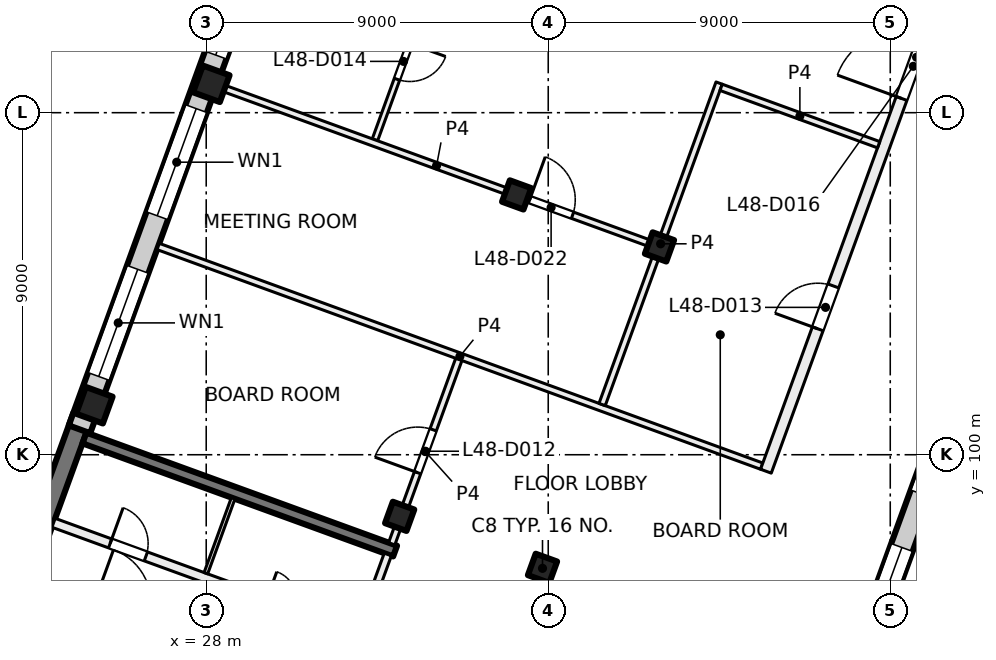
"""IFC4 building model, lengths in metres.
Left out: names, types, materials, properties, quantities, classifications, styles, units other than length and angle.
Written with IfcOpenShell. Run it as: python <this file> out.ifc"""

import sys

from ifc_helpers import new_model, si_unit, direction, frame, frame_2d, origin, origin_2d, place, context, subcontext, project, spatial, rectangle, extrude, element, fill, save


model = new_model("IFC4")
c1 = context("Model", 3, precision=1e-05, world=origin(), true_north=direction((0.0, 1.0)))
c2 = subcontext(c1, "Body", "Model", "MODEL_VIEW")
j1 = project(units=[si_unit("LENGTHUNIT", "METRE"), si_unit("PLANEANGLEUNIT", "RADIAN")], contexts=[c1])
p1 = place(None, origin())
s1 = spatial("IfcSite", under=j1, at=p1, CompositionType="ELEMENT")
p2 = place(p1, origin())
s2 = spatial("IfcBuilding", under=s1, at=p2, CompositionType="ELEMENT")
p3 = place(p2, frame((0.0, 0.0, 204.0)))
s3 = spatial("IfcBuildingStorey", under=s2, at=p3, CompositionType="ELEMENT", Elevation=204.0)
for number, where, z_axis, x_axis in (
    (1, (39.927, 105.468, 0.0), (0.0, 0.0, 1.0), (-0.342, -0.94, 0.0)),
    (2, (36.849, 97.011, 0.0), (0.0, 0.0, 1.0), (-0.342, -0.94, 0.0)),
    (3, (36.169, 106.836, 0.0), (0.0, 0.0, 1.0), (-0.342, -0.94, 0.0)),
    (4, (33.091, 98.379, 0.0), (0.0, 0.0, 1.0), (-0.342, -0.94, 0.0)),
):
    element("IfcColumn", number, at=place(p3, frame(where, z_axis=z_axis, x_axis=x_axis)), inside=s3, PredefinedType="COLUMN", context=c2, shape_type="SweptSolid", body=[
        extrude(rectangle(XDim=0.6, YDim=0.6, at=origin_2d()), origin(), (0.0, 0.0, 1.0), 4.0),
    ])
for number, where, z_axis, x_axis in (
    (5, (28.134, 109.76, 0.0), (0.0, 0.0, 1.0), (-0.342, -0.94, 0.0)),
    (6, (25.056, 101.303, 0.0), (0.0, 0.0, 1.0), (-0.342, -0.94, 0.0)),
):
    element("IfcColumn", number, at=place(p3, frame(where, z_axis=z_axis, x_axis=x_axis)), inside=s3, PredefinedType="COLUMN", context=c2, shape_type="SweptSolid", body=[
        extrude(rectangle(XDim=0.75, YDim=0.75, at=origin_2d()), origin(), (0.0, 0.0, 1.0), 4.0),
    ])
p4 = place(p3, frame((21.67, 92.585, 0.0), z_axis=(0.0, 0.0, 1.0), x_axis=(0.342035714298, 0.93968695327, 0.0)))
e7 = element("IfcWall", 7, at=p4, inside=s3, PredefinedType="SHEAR", context=c2, shape_type="SweptSolid", body=[
    extrude(rectangle(XDim=8.975, YDim=0.5, at=frame_2d((4.488, 0.0))), origin(), (0.0, 0.0, 1.0), 4.0),
])
p5 = place(p3, frame((32.971, 97.465, 0.0), z_axis=(0.0, 0.0, 1.0), x_axis=(-0.939695066972, 0.34201342241, 0.0)))
e8 = element("IfcWall", 8, at=p5, inside=s3, PredefinedType="SHEAR", context=c2, shape_type="SweptSolid", body=[
    extrude(rectangle(XDim=8.7, YDim=0.3, at=frame_2d((4.35, 0.0))), origin(), (0.0, 0.0, 1.0), 4.0),
])
p6 = place(p3, frame((52.212, 113.783, 0.0), z_axis=(0.0, 0.0, 1.0), x_axis=(-0.34202521188, -0.939690775968, 0.0)))
e9 = element("IfcWall", 9, at=p6, inside=s3, PredefinedType="SOLIDWALL", context=c2, shape_type="SweptSolid", body=[
    extrude(rectangle(XDim=21.745, YDim=0.6, at=frame_2d((10.873, 0.0))), origin(), (0.0, 0.0, 1.0), 3.625),
])
p7 = place(p6, frame((3.765, 0.0, 0.9)))
e10 = element("IfcOpeningElement", 10, at=p7, cuts=e9, PredefinedType="OPENING", context=c2, shape_type="SweptSolid", body=[
    extrude(rectangle(XDim=3.0, YDim=2.4, at=frame_2d((1.5, 1.2))), frame((0.0, 0.31, 0.0), z_axis=(0.0, -1.0, 0.0), x_axis=(1.0, 0.0, 0.0)), (0.0, 0.0, 1.0), 0.62),
])
p8 = place(p6, frame((8.265, 0.0, 0.9)))
e11 = element("IfcOpeningElement", 11, at=p8, cuts=e9, PredefinedType="OPENING", context=c2, shape_type="SweptSolid", body=[
    extrude(rectangle(XDim=3.0, YDim=2.4, at=frame_2d((1.5, 1.2))), frame((0.0, 0.31, 0.0), z_axis=(0.0, -1.0, 0.0), x_axis=(1.0, 0.0, 0.0)), (0.0, 0.0, 1.0), 0.62),
])
p9 = place(p6, frame((12.765, 0.0, 0.9)))
e12 = element("IfcOpeningElement", 12, at=p9, cuts=e9, PredefinedType="OPENING", context=c2, shape_type="SweptSolid", body=[
    extrude(rectangle(XDim=3.0, YDim=2.4, at=frame_2d((1.5, 1.2))), frame((0.0, 0.31, 0.0), z_axis=(0.0, -1.0, 0.0), x_axis=(1.0, 0.0, 0.0)), (0.0, 0.0, 1.0), 0.62),
])
p10 = place(p6, frame((17.265, 0.0, 0.9)))
e13 = element("IfcOpeningElement", 13, at=p10, cuts=e9, PredefinedType="OPENING", context=c2, shape_type="SweptSolid", body=[
    extrude(rectangle(XDim=3.0, YDim=2.4, at=frame_2d((1.5, 1.2))), frame((0.0, 0.31, 0.0), z_axis=(0.0, -1.0, 0.0), x_axis=(1.0, 0.0, 0.0)), (0.0, 0.0, 1.0), 0.62),
])
p11 = place(p3, frame((24.666, 100.669, 0.0), z_axis=(0.0, 0.0, 1.0), x_axis=(0.34201964167, 0.939692803373, 0.0)))
e14 = element("IfcWall", 14, at=p11, inside=s3, PredefinedType="SOLIDWALL", context=c2, shape_type="SweptSolid", body=[
    extrude(rectangle(XDim=32.884, YDim=0.6, at=frame_2d((16.442, 0.0))), origin(), (0.0, 0.0, 1.0), 3.625),
])
p12 = place(p11, frame((1.48, 0.0, 0.9)))
e15 = element("IfcOpeningElement", 15, at=p12, cuts=e14, PredefinedType="OPENING", context=c2, shape_type="SweptSolid", body=[
    extrude(rectangle(XDim=3.0, YDim=2.4, at=frame_2d((1.5, 1.2))), frame((0.0, 0.31, 0.0), z_axis=(0.0, -1.0, 0.0), x_axis=(1.0, 0.0, 0.0)), (0.0, 0.0, 1.0), 0.62),
])
p13 = place(p11, frame((5.98, 0.0, 0.9)))
e16 = element("IfcOpeningElement", 16, at=p13, cuts=e14, PredefinedType="OPENING", context=c2, shape_type="SweptSolid", body=[
    extrude(rectangle(XDim=3.0, YDim=2.4, at=frame_2d((1.5, 1.2))), frame((0.0, 0.31, 0.0), z_axis=(0.0, -1.0, 0.0), x_axis=(1.0, 0.0, 0.0)), (0.0, 0.0, 1.0), 0.62),
])
p14 = place(p11, frame((10.48, 0.0, 0.9)))
e17 = element("IfcOpeningElement", 17, at=p14, cuts=e14, PredefinedType="OPENING", context=c2, shape_type="SweptSolid", body=[
    extrude(rectangle(XDim=3.0, YDim=2.4, at=frame_2d((1.5, 1.2))), frame((0.0, 0.31, 0.0), z_axis=(0.0, -1.0, 0.0), x_axis=(1.0, 0.0, 0.0)), (0.0, 0.0, 1.0), 0.62),
])
p15 = place(p11, frame((15.58, 0.0, 0.0)))
e18 = element("IfcOpeningElement", 18, at=p15, cuts=e14, PredefinedType="OPENING", context=c2, shape_type="SweptSolid", body=[
    extrude(rectangle(XDim=1.8, YDim=2.4, at=frame_2d((0.9, 1.2))), frame((0.0, 0.31, 0.0), z_axis=(0.0, -1.0, 0.0), x_axis=(1.0, 0.0, 0.0)), (0.0, 0.0, 1.0), 0.62),
])
p16 = place(p11, frame((19.48, 0.0, 0.9)))
e19 = element("IfcOpeningElement", 19, at=p16, cuts=e14, PredefinedType="OPENING", context=c2, shape_type="SweptSolid", body=[
    extrude(rectangle(XDim=3.0, YDim=2.4, at=frame_2d((1.5, 1.2))), frame((0.0, 0.31, 0.0), z_axis=(0.0, -1.0, 0.0), x_axis=(1.0, 0.0, 0.0)), (0.0, 0.0, 1.0), 0.62),
])
p17 = place(p11, frame((23.98, 0.0, 0.9)))
e20 = element("IfcOpeningElement", 20, at=p17, cuts=e14, PredefinedType="OPENING", context=c2, shape_type="SweptSolid", body=[
    extrude(rectangle(XDim=3.0, YDim=2.4, at=frame_2d((1.5, 1.2))), frame((0.0, 0.31, 0.0), z_axis=(0.0, -1.0, 0.0), x_axis=(1.0, 0.0, 0.0)), (0.0, 0.0, 1.0), 0.62),
])
p18 = place(p11, frame((29.08, 0.0, 0.0)))
e21 = element("IfcOpeningElement", 21, at=p18, cuts=e14, PredefinedType="OPENING", context=c2, shape_type="SweptSolid", body=[
    extrude(rectangle(XDim=1.8, YDim=2.4, at=frame_2d((0.9, 1.2))), frame((0.0, 0.31, 0.0), z_axis=(0.0, -1.0, 0.0), x_axis=(1.0, 0.0, 0.0)), (0.0, 0.0, 1.0), 0.62),
])
p19 = place(p3, frame((31.427, 93.663, 0.0), z_axis=(0.0, 0.0, 1.0), x_axis=(0.342030870568, 0.93968871632, 0.0)))
e22 = element("IfcWall", 22, at=p19, inside=s3, PredefinedType="PARTITIONING", context=c2, shape_type="SweptSolid", body=[
    extrude(rectangle(XDim=3.95, YDim=0.2, at=frame_2d((1.975, 0.0))), origin(), (0.0, 0.0, 1.0), 3.625),
])
p20 = place(p19, frame((0.3, 0.0, 0.0)))
e23 = element("IfcOpeningElement", 23, at=p20, cuts=e22, PredefinedType="OPENING", context=c2, shape_type="SweptSolid", body=[
    extrude(rectangle(XDim=1.2, YDim=2.1, at=frame_2d((0.6, 1.05))), frame((0.0, 0.11, 0.0), z_axis=(0.0, -1.0, 0.0), x_axis=(1.0, 0.0, 0.0)), (0.0, 0.0, 1.0), 0.22),
])
p21 = place(p3, frame((23.427, 96.682, 0.0), z_axis=(0.0, 0.0, 1.0), x_axis=(0.939690465531, -0.342026064782, 0.0)))
e24 = element("IfcWall", 24, at=p21, inside=s3, PredefinedType="PARTITIONING", context=c2, shape_type="SweptSolid", body=[
    extrude(rectangle(XDim=8.45, YDim=0.2, at=frame_2d((4.225, 0.0))), origin(), (0.0, 0.0, 1.0), 3.625),
])
p22 = place(p21, frame((1.725, 0.0, 0.0)))
e25 = element("IfcOpeningElement", 25, at=p22, cuts=e24, PredefinedType="OPENING", context=c2, shape_type="SweptSolid", body=[
    extrude(rectangle(XDim=1.5, YDim=2.1, at=frame_2d((0.75, 1.05))), frame((0.0, 0.11, 0.0), z_axis=(0.0, -1.0, 0.0), x_axis=(1.0, 0.0, 0.0)), (0.0, 0.0, 1.0), 0.22),
])
p23 = place(p3, frame((23.983, 98.208, 0.0), z_axis=(0.0, 0.0, 1.0), x_axis=(0.939699751196, -0.342000552051, 0.0)))
e26 = element("IfcWall", 26, at=p23, inside=s3, PredefinedType="PARTITIONING", context=c2, shape_type="SweptSolid", body=[
    extrude(rectangle(XDim=8.45, YDim=0.25, at=frame_2d((4.225, 0.0))), origin(), (0.0, 0.0, 1.0), 3.625),
])
p24 = place(p23, frame((5.96, 0.0, 0.0)))
e27 = element("IfcOpeningElement", 27, at=p24, cuts=e26, PredefinedType="OPENING", context=c2, shape_type="SweptSolid", body=[
    extrude(rectangle(XDim=0.8, YDim=2.1, at=frame_2d((0.4, 1.05))), frame((0.0, 0.135, 0.0), z_axis=(0.0, -1.0, 0.0), x_axis=(1.0, 0.0, 0.0)), (0.0, 0.0, 1.0), 0.27),
])
p25 = place(p23, frame((1.585, 0.0, 0.0)))
e28 = element("IfcOpeningElement", 28, at=p25, cuts=e26, PredefinedType="OPENING", context=c2, shape_type="SweptSolid", body=[
    extrude(rectangle(XDim=1.0, YDim=2.1, at=frame_2d((0.5, 1.05))), frame((0.0, 0.135, 0.0), z_axis=(0.0, -1.0, 0.0), x_axis=(1.0, 0.0, 0.0)), (0.0, 0.0, 1.0), 0.27),
])
p26 = place(p3, frame((27.991, 96.883, 0.0), z_axis=(0.0, 0.0, 1.0), x_axis=(0.342023078919, 0.939691552312, 0.0)))
e29 = element("IfcWall", 29, at=p26, inside=s3, PredefinedType="PARTITIONING", context=c2, shape_type="SweptSolid", body=[
    extrude(rectangle(XDim=2.1, YDim=0.1, at=frame_2d((1.05, 0.0))), origin(), (0.0, 0.0, 1.0), 3.625),
])
p27 = place(p3, frame((26.736, 105.48, 0.0), z_axis=(0.0, 0.0, 1.0), x_axis=(0.939695108427, -0.342013308511, 0.0)))
e30 = element("IfcWall", 30, at=p27, inside=s3, PredefinedType="PARTITIONING", context=c2, shape_type="SweptSolid", body=[
    extrude(rectangle(XDim=16.9, YDim=0.175, at=frame_2d((8.45, 0.0))), origin(), (0.0, 0.0, 1.0), 3.625),
])
p28 = place(p3, frame((38.54, 125.049, 0.0), z_axis=(0.0, 0.0, 1.0), x_axis=(-0.341960632782, -0.939714278719, 0.0)))
e31 = element("IfcWall", 31, at=p28, inside=s3, PredefinedType="PARTITIONING", context=c2, shape_type="SweptSolid", body=[
    extrude(rectangle(XDim=17.839, YDim=0.15, at=frame_2d((8.919, 0.0))), origin(), (0.0, 0.0, 1.0), 3.625),
])
p29 = place(p28, frame((15.142, 0.0, 0.0)))
e32 = element("IfcOpeningElement", 32, at=p29, cuts=e31, PredefinedType="OPENING", context=c2, shape_type="SweptSolid", body=[
    extrude(rectangle(XDim=1.0, YDim=2.1, at=frame_2d((0.5, 1.05))), frame((0.0, 0.085, 0.0), z_axis=(0.0, -1.0, 0.0), x_axis=(1.0, 0.0, 0.0)), (0.0, 0.0, 1.0), 0.17),
])
p30 = place(p28, frame((10.675, 0.0, 0.0)))
e33 = element("IfcOpeningElement", 33, at=p30, cuts=e31, PredefinedType="OPENING", context=c2, shape_type="SweptSolid", body=[
    extrude(rectangle(XDim=1.0, YDim=2.1, at=frame_2d((0.5, 1.05))), frame((0.0, 0.085, 0.0), z_axis=(0.0, -1.0, 0.0), x_axis=(1.0, 0.0, 0.0)), (0.0, 0.0, 1.0), 0.17),
])
p31 = place(p28, frame((6.176, 0.0, 0.0)))
e34 = element("IfcOpeningElement", 34, at=p31, cuts=e31, PredefinedType="OPENING", context=c2, shape_type="SweptSolid", body=[
    extrude(rectangle(XDim=1.0, YDim=2.1, at=frame_2d((0.5, 1.05))), frame((0.0, 0.085, 0.0), z_axis=(0.0, -1.0, 0.0), x_axis=(1.0, 0.0, 0.0)), (0.0, 0.0, 1.0), 0.17),
])
p32 = place(p28, frame((1.703, 0.0, 0.0)))
e35 = element("IfcOpeningElement", 35, at=p32, cuts=e31, PredefinedType="OPENING", context=c2, shape_type="SweptSolid", body=[
    extrude(rectangle(XDim=1.0, YDim=2.1, at=frame_2d((0.5, 1.05))), frame((0.0, 0.085, 0.0), z_axis=(0.0, -1.0, 0.0), x_axis=(1.0, 0.0, 0.0)), (0.0, 0.0, 1.0), 0.17),
])
p33 = place(p3, frame((32.881, 97.657, 0.0), z_axis=(0.0, 0.0, 1.0), x_axis=(0.342058204353, 0.939678766832, 0.0)))
e36 = element("IfcWall", 36, at=p33, inside=s3, PredefinedType="PARTITIONING", context=c2, shape_type="SweptSolid", body=[
    extrude(rectangle(XDim=5.163, YDim=0.175, at=frame_2d((2.581, 0.0))), origin(), (0.0, 0.0, 1.0), 3.625),
])
p34 = place(p33, frame((1.991, 0.0, 0.0)))
e37 = element("IfcOpeningElement", 37, at=p34, cuts=e36, PredefinedType="OPENING", context=c2, shape_type="SweptSolid", body=[
    extrude(rectangle(XDim=1.2, YDim=2.1, at=frame_2d((0.6, 1.05))), frame((0.0, 0.097, 0.0), z_axis=(0.0, -1.0, 0.0), x_axis=(1.0, 0.0, 0.0)), (0.0, 0.0, 1.0), 0.195),
])
p35 = place(p3, frame((38.418, 101.321, 0.0), z_axis=(0.0, 0.0, 1.0), x_axis=(0.342082778631, 0.939669821035, 0.0)))
e38 = element("IfcWall", 38, at=p35, inside=s3, PredefinedType="PARTITIONING", context=c2, shape_type="SweptSolid", body=[
    extrude(rectangle(XDim=9.001, YDim=0.175, at=frame_2d((4.5, 0.0))), origin(), (0.0, 0.0, 1.0), 3.625),
])
p36 = place(p3, frame((28.275, 109.709, 0.0), z_axis=(0.0, 0.0, 1.0), x_axis=(0.939707717516, -0.341978662553, 0.0)))
e39 = element("IfcWall", 39, at=p36, inside=s3, PredefinedType="PARTITIONING", context=c2, shape_type="SweptSolid", body=[
    extrude(rectangle(XDim=12.313, YDim=0.175, at=frame_2d((6.157, 0.0))), origin(), (0.0, 0.0, 1.0), 3.625),
])
p37 = place(p36, frame((8.765, 0.0, 0.0)))
e40 = element("IfcOpeningElement", 40, at=p37, cuts=e39, PredefinedType="OPENING", context=c2, shape_type="SweptSolid", body=[
    extrude(rectangle(XDim=1.2, YDim=2.1, at=frame_2d((0.6, 1.05))), frame((0.0, 0.097, 0.0), z_axis=(0.0, -1.0, 0.0), x_axis=(1.0, 0.0, 0.0)), (0.0, 0.0, 1.0), 0.195),
])
p38 = place(p3, frame((42.728, 99.567, 0.0), z_axis=(0.0, 0.0, 1.0), x_axis=(0.342016197204, 0.939694057048, 0.0)))
e41 = element("IfcWall", 41, at=p38, inside=s3, PredefinedType="PARTITIONING", context=c2, shape_type="SweptSolid", body=[
    extrude(rectangle(XDim=23.18, YDim=0.3, at=frame_2d((11.59, 0.0))), origin(), (0.0, 0.0, 1.0), 3.625),
])
p39 = place(p38, frame((3.987, 0.0, 0.0)))
e42 = element("IfcOpeningElement", 42, at=p39, cuts=e41, PredefinedType="OPENING", context=c2, shape_type="SweptSolid", body=[
    extrude(rectangle(XDim=1.2, YDim=2.1, at=frame_2d((0.6, 1.05))), frame((0.0, 0.16, 0.0), z_axis=(0.0, -1.0, 0.0), x_axis=(1.0, 0.0, 0.0)), (0.0, 0.0, 1.0), 0.32),
])
p40 = place(p38, frame((10.437, 0.0, 0.0)))
e43 = element("IfcOpeningElement", 43, at=p40, cuts=e41, PredefinedType="OPENING", context=c2, shape_type="SweptSolid", body=[
    extrude(rectangle(XDim=1.8, YDim=2.1, at=frame_2d((0.9, 1.05))), frame((0.0, 0.16, 0.0), z_axis=(0.0, -1.0, 0.0), x_axis=(1.0, 0.0, 0.0)), (0.0, 0.0, 1.0), 0.32),
])
p41 = place(p38, frame((14.687, 0.0, 0.0)))
e44 = element("IfcOpeningElement", 44, at=p41, cuts=e41, PredefinedType="OPENING", context=c2, shape_type="SweptSolid", body=[
    extrude(rectangle(XDim=0.8, YDim=2.1, at=frame_2d((0.4, 1.05))), frame((0.0, 0.16, 0.0), z_axis=(0.0, -1.0, 0.0), x_axis=(1.0, 0.0, 0.0)), (0.0, 0.0, 1.0), 0.32),
])
p42 = place(p3, frame((45.695, 108.157, 0.0), z_axis=(0.0, 0.0, 1.0), x_axis=(-0.939620446327, 0.342218375959, 0.0)))
e45 = element("IfcWall", 45, at=p42, inside=s3, PredefinedType="PARTITIONING", context=c2, shape_type="SweptSolid", body=[
    extrude(rectangle(XDim=4.412, YDim=0.175, at=frame_2d((2.206, 0.0))), origin(), (0.0, 0.0, 1.0), 3.625),
])
p43 = place(p10, origin())
e46 = element("IfcWindow", 46, at=p43, inside=s3, PartitioningType="SINGLE_PANEL", PredefinedType="WINDOW", context=c2, shape_type="SweptSolid", body=[
    extrude(rectangle(XDim=3.0, YDim=2.4, at=frame_2d((1.5, 1.2))), frame((0.0, 0.03, 0.0), z_axis=(0.0, -1.0, 0.0), x_axis=(1.0, 0.0, 0.0)), (0.0, 0.0, 1.0), 0.06),
])
fill(e13, e46)
p44 = place(p12, origin())
e47 = element("IfcWindow", 47, at=p44, inside=s3, PartitioningType="SINGLE_PANEL", PredefinedType="WINDOW", context=c2, shape_type="SweptSolid", body=[
    extrude(rectangle(XDim=3.0, YDim=2.4, at=frame_2d((1.5, 1.2))), frame((0.0, 0.03, 0.0), z_axis=(0.0, -1.0, 0.0), x_axis=(1.0, 0.0, 0.0)), (0.0, 0.0, 1.0), 0.06),
])
fill(e15, e47)
p45 = place(p13, origin())
e48 = element("IfcWindow", 48, at=p45, inside=s3, PartitioningType="SINGLE_PANEL", PredefinedType="WINDOW", context=c2, shape_type="SweptSolid", body=[
    extrude(rectangle(XDim=3.0, YDim=2.4, at=frame_2d((1.5, 1.2))), frame((0.0, 0.03, 0.0), z_axis=(0.0, -1.0, 0.0), x_axis=(1.0, 0.0, 0.0)), (0.0, 0.0, 1.0), 0.06),
])
fill(e16, e48)
p46 = place(p14, origin())
e49 = element("IfcWindow", 49, at=p46, inside=s3, PartitioningType="SINGLE_PANEL", PredefinedType="WINDOW", context=c2, shape_type="SweptSolid", body=[
    extrude(rectangle(XDim=3.0, YDim=2.4, at=frame_2d((1.5, 1.2))), frame((0.0, 0.03, 0.0), z_axis=(0.0, -1.0, 0.0), x_axis=(1.0, 0.0, 0.0)), (0.0, 0.0, 1.0), 0.06),
])
fill(e17, e49)
p47 = place(p25, origin())
e50 = element("IfcDoor", 50, at=p47, inside=s3, OperationType="SINGLE_SWING_RIGHT", PredefinedType="DOOR", context=c2, shape_type="SweptSolid", body=[
    extrude(rectangle(XDim=1.0, YDim=2.1, at=frame_2d((0.5, 1.05))), frame((0.0, 0.025, 0.0), z_axis=(0.0, -1.0, 0.0), x_axis=(1.0, 0.0, 0.0)), (0.0, 0.0, 1.0), 0.05),
])
fill(e28, e50)
p48 = place(p34, origin())
e51 = element("IfcDoor", 51, at=p48, inside=s3, OperationType="DOUBLE_DOOR_SINGLE_SWING", PredefinedType="DOOR", context=c2, shape_type="SweptSolid", body=[
    extrude(rectangle(XDim=1.2, YDim=2.1, at=frame_2d((0.6, 1.05))), frame((0.0, 0.025, 0.0), z_axis=(0.0, -1.0, 0.0), x_axis=(1.0, 0.0, 0.0)), (0.0, 0.0, 1.0), 0.05),
])
fill(e37, e51)
p49 = place(p39, origin())
e52 = element("IfcDoor", 52, at=p49, inside=s3, OperationType="DOUBLE_DOOR_SINGLE_SWING", PredefinedType="DOOR", context=c2, shape_type="SweptSolid", body=[
    extrude(rectangle(XDim=1.2, YDim=2.1, at=frame_2d((0.6, 1.05))), frame((0.0, 0.025, 0.0), z_axis=(0.0, -1.0, 0.0), x_axis=(1.0, 0.0, 0.0)), (0.0, 0.0, 1.0), 0.05),
])
fill(e42, e52)
p50 = place(p29, origin())
e53 = element("IfcDoor", 53, at=p50, inside=s3, OperationType="SINGLE_SWING_LEFT", PredefinedType="DOOR", context=c2, shape_type="SweptSolid", body=[
    extrude(rectangle(XDim=1.0, YDim=2.1, at=frame_2d((0.5, 1.05))), frame((0.0, 0.025, 0.0), z_axis=(0.0, -1.0, 0.0), x_axis=(1.0, 0.0, 0.0)), (0.0, 0.0, 1.0), 0.05),
])
fill(e32, e53)
p51 = place(p40, origin())
e54 = element("IfcDoor", 54, at=p51, inside=s3, OperationType="DOUBLE_DOOR_SINGLE_SWING", PredefinedType="DOOR", context=c2, shape_type="SweptSolid", body=[
    extrude(rectangle(XDim=1.8, YDim=2.1, at=frame_2d((0.9, 1.05))), frame((0.0, 0.025, 0.0), z_axis=(0.0, -1.0, 0.0), x_axis=(1.0, 0.0, 0.0)), (0.0, 0.0, 1.0), 0.05),
])
fill(e43, e54)
p52 = place(p37, origin())
e55 = element("IfcDoor", 55, at=p52, inside=s3, OperationType="DOUBLE_DOOR_SINGLE_SWING", PredefinedType="DOOR", context=c2, shape_type="SweptSolid", body=[
    extrude(rectangle(XDim=1.2, YDim=2.1, at=frame_2d((0.6, 1.05))), frame((0.0, 0.025, 0.0), z_axis=(0.0, -1.0, 0.0), x_axis=(1.0, 0.0, 0.0)), (0.0, 0.0, 1.0), 0.05),
])
fill(e40, e55)
save(model, sys.argv[1])
